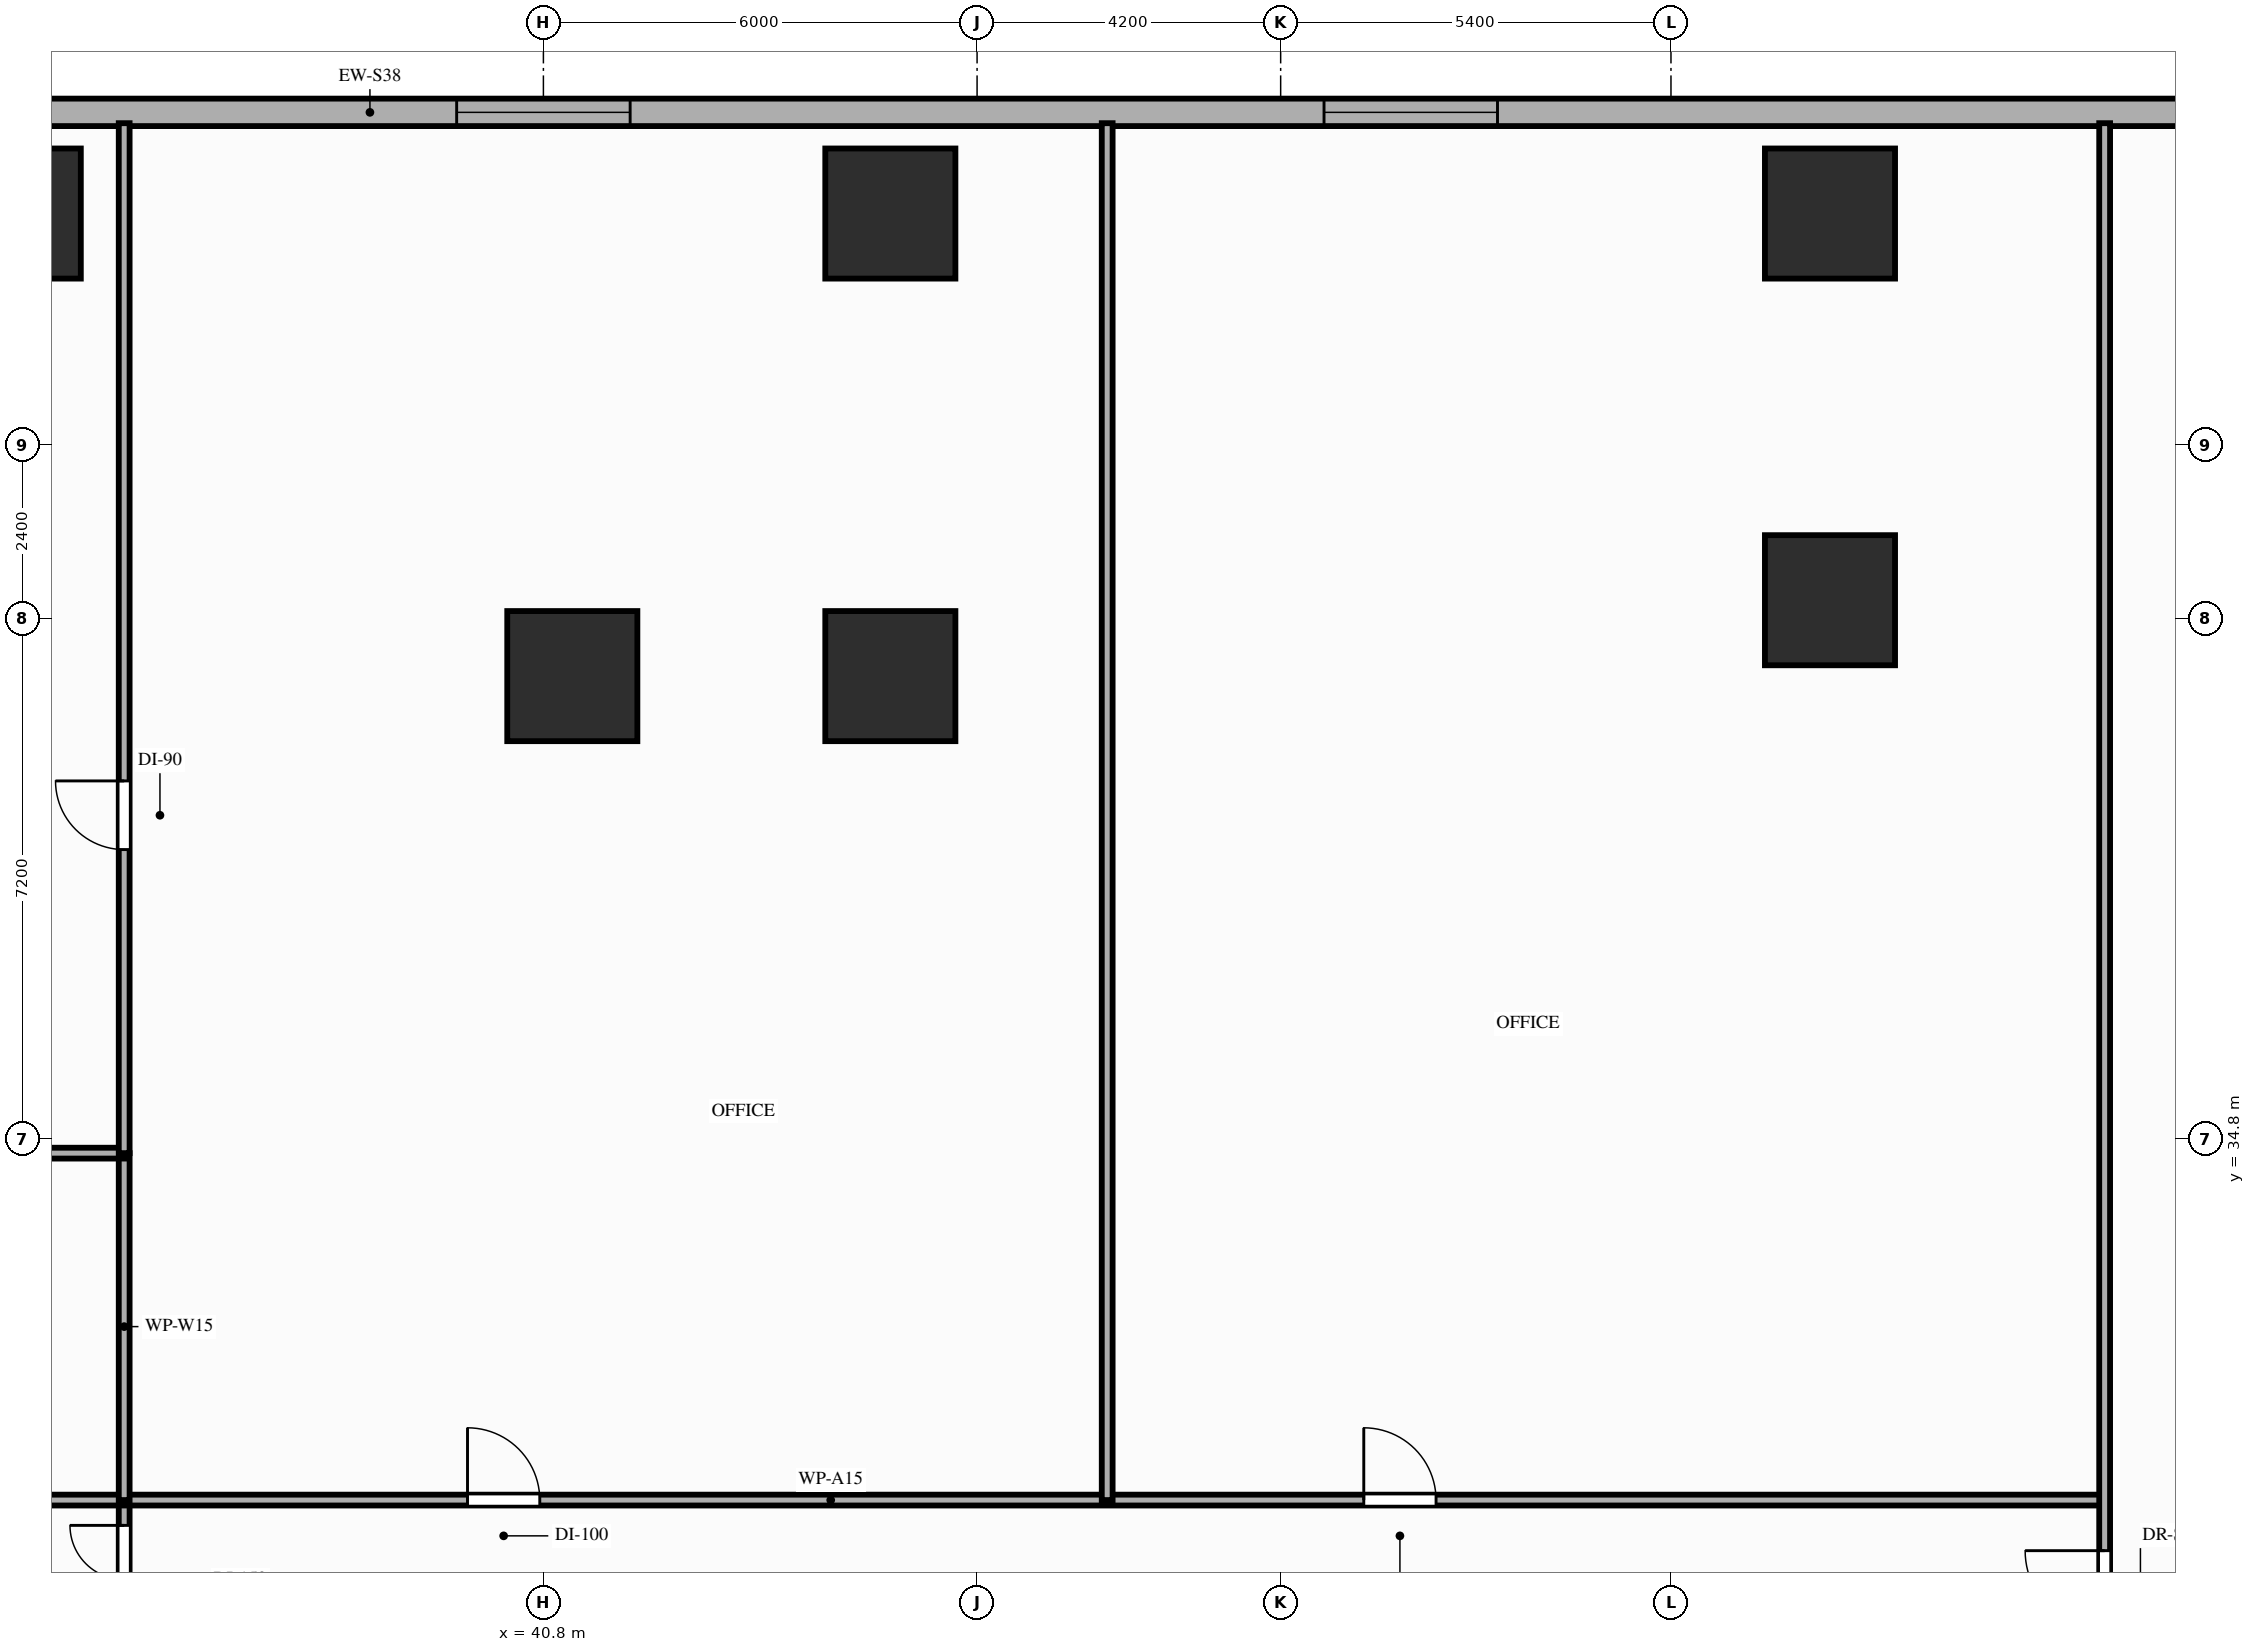
"""IFC4 building model, lengths in metres.
Left out: names, types, materials, properties, quantities, classifications, styles, units other than length and angle.
Written with IfcOpenShell. Run it as: python <this file> out.ifc"""

import sys

from ifc_helpers import new_model, si_unit, direction, frame, frame_2d, origin, origin_2d, place, context, subcontext, project, spatial, rectangle, extrude, element, fill, save


model = new_model("IFC4")
c1 = context("Model", 3, precision=1e-05, world=origin(), true_north=direction((0.0, 1.0)))
c2 = subcontext(c1, "Body", "Model", "MODEL_VIEW")
j1 = project(units=[si_unit("LENGTHUNIT", "METRE"), si_unit("PLANEANGLEUNIT", "RADIAN")], contexts=[c1])
p1 = place(None, origin())
s1 = spatial("IfcSite", under=j1, at=p1, CompositionType="ELEMENT")
p2 = place(p1, origin())
s2 = spatial("IfcBuilding", under=s1, at=p2, CompositionType="ELEMENT")
p3 = place(p2, frame((0.0, 0.0, 4.6)))
s3 = spatial("IfcBuildingStorey", under=s2, at=p3, CompositionType="ELEMENT", Elevation=4.6)
for number, where, z_axis, x_axis in (
    (1, (41.2, 41.2, 0.0), (0.0, 0.0, 1.0), (1.0, 0.0, 0.0)),
    (2, (45.6, 41.2, 0.0), (0.0, 0.0, 1.0), (1.0, 0.0, 0.0)),
    (3, (58.6, 42.25, 0.0), (0.0, 0.0, 1.0), (1.0, 0.0, 0.0)),
    (4, (33.5, 47.6, 0.0), (0.0, 0.0, 1.0), (1.0, 0.0, 0.0)),
    (5, (45.6, 47.6, 0.0), (0.0, 0.0, 1.0), (1.0, 0.0, 0.0)),
    (6, (58.6, 47.6, 0.0), (0.0, 0.0, 1.0), (1.0, 0.0, 0.0)),
):
    element("IfcColumn", number, at=place(p3, frame(where, z_axis=z_axis, x_axis=x_axis)), inside=s3, PredefinedType="COLUMN", context=c2, shape_type="SweptSolid", body=[
        extrude(rectangle(XDim=1.8, YDim=1.8, at=origin_2d()), origin(), (0.0, 0.0, 1.0), 4.2),
    ])
p4 = place(p3, frame((73.2, 49.0, 0.0), z_axis=(0.0, 0.0, 1.0), x_axis=(-1.0, 0.0, 0.0)))
e7 = element("IfcWall", 7, at=p4, inside=s3, PredefinedType="STANDARD", context=c2, shape_type="SweptSolid", body=[
    extrude(rectangle(XDim=69.6, YDim=0.38, at=frame_2d((34.8, 0.0))), origin(), (0.0, 0.0, 1.0), 3.95),
])
p5 = place(p4, frame((3.4, 0.0, 0.9)))
e8 = element("IfcOpeningElement", 8, at=p5, cuts=e7, PredefinedType="OPENING", context=c2, shape_type="SweptSolid", body=[
    extrude(rectangle(XDim=2.4, YDim=2.15, at=frame_2d((1.2, 1.075))), frame((0.0, 0.2, 0.0), z_axis=(0.0, -1.0, 0.0), x_axis=(1.0, 0.0, 0.0)), (0.0, 0.0, 1.0), 0.4),
])
p6 = place(p4, frame((19.2, 0.0, 0.9)))
e9 = element("IfcOpeningElement", 9, at=p6, cuts=e7, PredefinedType="OPENING", context=c2, shape_type="SweptSolid", body=[
    extrude(rectangle(XDim=2.4, YDim=2.15, at=frame_2d((1.2, 1.075))), frame((0.0, 0.2, 0.0), z_axis=(0.0, -1.0, 0.0), x_axis=(1.0, 0.0, 0.0)), (0.0, 0.0, 1.0), 0.4),
])
p7 = place(p4, frame((31.2, 0.0, 0.9)))
e10 = element("IfcOpeningElement", 10, at=p7, cuts=e7, PredefinedType="OPENING", context=c2, shape_type="SweptSolid", body=[
    extrude(rectangle(XDim=2.4, YDim=2.15, at=frame_2d((1.2, 1.075))), frame((0.0, 0.2, 0.0), z_axis=(0.0, -1.0, 0.0), x_axis=(1.0, 0.0, 0.0)), (0.0, 0.0, 1.0), 0.4),
])
p8 = place(p4, frame((43.4, 0.0, 0.9)))
e11 = element("IfcOpeningElement", 11, at=p8, cuts=e7, PredefinedType="OPENING", context=c2, shape_type="SweptSolid", body=[
    extrude(rectangle(XDim=2.4, YDim=2.15, at=frame_2d((1.2, 1.075))), frame((0.0, 0.2, 0.0), z_axis=(0.0, -1.0, 0.0), x_axis=(1.0, 0.0, 0.0)), (0.0, 0.0, 1.0), 0.4),
])
p9 = place(p4, frame((55.6, 0.0, 0.9)))
e12 = element("IfcOpeningElement", 12, at=p9, cuts=e7, PredefinedType="OPENING", context=c2, shape_type="SweptSolid", body=[
    extrude(rectangle(XDim=2.4, YDim=2.15, at=frame_2d((1.2, 1.075))), frame((0.0, 0.2, 0.0), z_axis=(0.0, -1.0, 0.0), x_axis=(1.0, 0.0, 0.0)), (0.0, 0.0, 1.0), 0.4),
])
p10 = place(p3, frame((35.0, 27.6, 0.0), z_axis=(0.0, 0.0, 1.0), x_axis=(0.0, 1.0, 0.0)))
e13 = element("IfcWall", 13, at=p10, inside=s3, PredefinedType="PARTITIONING", context=c2, shape_type="SweptSolid", body=[
    extrude(rectangle(XDim=2.2, YDim=0.15, at=frame_2d((1.1, 0.0))), origin(), (0.0, 0.0, 1.0), 3.23),
])
p11 = place(p10, frame((0.35, 0.0, 0.0)))
e14 = element("IfcOpeningElement", 14, at=p11, cuts=e13, PredefinedType="OPENING", context=c2, shape_type="SweptSolid", body=[
    extrude(rectangle(XDim=1.5, YDim=2.18, at=frame_2d((0.75, 1.09))), frame((0.0, 0.085, 0.0), z_axis=(0.0, -1.0, 0.0), x_axis=(1.0, 0.0, 0.0)), (0.0, 0.0, 1.0), 0.17),
])
p12 = place(p3, frame((27.15, 29.8, 0.0), z_axis=(0.0, 0.0, 1.0), x_axis=(1.0, 0.0, 0.0)))
e15 = element("IfcWall", 15, at=p12, inside=s3, PredefinedType="PARTITIONING", context=c2, shape_type="SweptSolid", body=[
    extrude(rectangle(XDim=35.25, YDim=0.15, at=frame_2d((17.625, 0.0))), origin(), (0.0, 0.0, 1.0), 3.23),
])
p13 = place(p12, frame((25.0, 0.0, 0.0)))
e16 = element("IfcOpeningElement", 16, at=p13, cuts=e15, PredefinedType="OPENING", context=c2, shape_type="SweptSolid", body=[
    extrude(rectangle(XDim=1.0, YDim=2.15, at=frame_2d((0.5, 1.075))), frame((0.0, 0.085, 0.0), z_axis=(0.0, -1.0, 0.0), x_axis=(1.0, 0.0, 0.0)), (0.0, 0.0, 1.0), 0.17),
])
p14 = place(p12, frame((1.4, 0.0, 0.0)))
e17 = element("IfcOpeningElement", 17, at=p14, cuts=e15, PredefinedType="OPENING", context=c2, shape_type="SweptSolid", body=[
    extrude(rectangle(XDim=0.85, YDim=2.1, at=frame_2d((0.425, 1.05))), frame((0.0, 0.085, 0.0), z_axis=(0.0, -1.0, 0.0), x_axis=(1.0, 0.0, 0.0)), (0.0, 0.0, 1.0), 0.17),
])
p15 = place(p12, frame((5.4, 0.0, 0.0)))
e18 = element("IfcOpeningElement", 18, at=p15, cuts=e15, PredefinedType="OPENING", context=c2, shape_type="SweptSolid", body=[
    extrude(rectangle(XDim=0.95, YDim=2.1, at=frame_2d((0.475, 1.05))), frame((0.0, 0.085, 0.0), z_axis=(0.0, -1.0, 0.0), x_axis=(1.0, 0.0, 0.0)), (0.0, 0.0, 1.0), 0.17),
])
p16 = place(p12, frame((12.6, 0.0, 0.0)))
e19 = element("IfcOpeningElement", 19, at=p16, cuts=e15, PredefinedType="OPENING", context=c2, shape_type="SweptSolid", body=[
    extrude(rectangle(XDim=1.0, YDim=2.15, at=frame_2d((0.5, 1.075))), frame((0.0, 0.085, 0.0), z_axis=(0.0, -1.0, 0.0), x_axis=(1.0, 0.0, 0.0)), (0.0, 0.0, 1.0), 0.17),
])
p17 = place(p3, frame((35.0, 29.8, 0.0), z_axis=(0.0, 0.0, 1.0), x_axis=(0.0, 1.0, 0.0)))
e20 = element("IfcWall", 20, at=p17, inside=s3, PredefinedType="PARTITIONING", context=c2, shape_type="SweptSolid", body=[
    extrude(rectangle(XDim=4.8, YDim=0.15, at=frame_2d((2.4, 0.0))), origin(), (0.0, 0.0, 1.0), 3.95),
])
p18 = place(p3, frame((27.15, 34.6, 0.0), z_axis=(0.0, 0.0, 1.0), x_axis=(1.0, 0.0, 0.0)))
e21 = element("IfcWall", 21, at=p18, inside=s3, PredefinedType="PARTITIONING", context=c2, shape_type="SweptSolid", body=[
    extrude(rectangle(XDim=7.85, YDim=0.15, at=frame_2d((3.925, 0.0))), origin(), (0.0, 0.0, 1.0), 3.23),
])
p19 = place(p3, frame((35.0, 34.6, 0.0), z_axis=(0.0, 0.0, 1.0), x_axis=(0.0, 1.0, 0.0)))
e22 = element("IfcWall", 22, at=p19, inside=s3, PredefinedType="PARTITIONING", context=c2, shape_type="SweptSolid", body=[
    extrude(rectangle(XDim=14.25, YDim=0.15, at=frame_2d((7.125, 0.0))), origin(), (0.0, 0.0, 1.0), 3.23),
])
p20 = place(p19, frame((4.2, 0.0, 0.0)))
e23 = element("IfcOpeningElement", 23, at=p20, cuts=e22, PredefinedType="OPENING", context=c2, shape_type="SweptSolid", body=[
    extrude(rectangle(XDim=0.95, YDim=2.15, at=frame_2d((0.475, 1.075))), frame((0.0, 0.085, 0.0), z_axis=(0.0, -1.0, 0.0), x_axis=(1.0, 0.0, 0.0)), (0.0, 0.0, 1.0), 0.17),
])
p21 = place(p3, frame((48.6, 29.8, 0.0), z_axis=(0.0, 0.0, 1.0), x_axis=(0.0, 1.0, 0.0)))
e24 = element("IfcWall", 24, at=p21, inside=s3, PredefinedType="PARTITIONING", context=c2, shape_type="SweptSolid", body=[
    extrude(rectangle(XDim=19.05, YDim=0.15, at=frame_2d((9.525, 0.0))), origin(), (0.0, 0.0, 1.0), 3.23),
])
p22 = place(p3, frame((62.4, 21.8, 0.0), z_axis=(0.0, 0.0, 1.0), x_axis=(0.0, 1.0, 0.0)))
e25 = element("IfcWall", 25, at=p22, inside=s3, PredefinedType="PARTITIONING", context=c2, shape_type="SweptSolid", body=[
    extrude(rectangle(XDim=27.05, YDim=0.15, at=frame_2d((13.525, 0.0))), origin(), (0.0, 0.0, 1.0), 3.23),
])
p23 = place(p22, frame((6.2, 0.0, 0.0)))
e26 = element("IfcOpeningElement", 26, at=p23, cuts=e25, PredefinedType="OPENING", context=c2, shape_type="SweptSolid", body=[
    extrude(rectangle(XDim=1.1, YDim=2.15, at=frame_2d((0.55, 1.075))), frame((0.0, 0.085, 0.0), z_axis=(0.0, -1.0, 0.0), x_axis=(1.0, 0.0, 0.0)), (0.0, 0.0, 1.0), 0.17),
])
p24 = place(p6, origin())
e27 = element("IfcWindow", 27, at=p24, inside=s3, PartitioningType="SINGLE_PANEL", PredefinedType="WINDOW", context=c2, shape_type="SweptSolid", body=[
    extrude(rectangle(XDim=2.4, YDim=2.15, at=frame_2d((1.2, 1.075))), frame((0.0, 0.03, 0.0), z_axis=(0.0, -1.0, 0.0), x_axis=(1.0, 0.0, 0.0)), (0.0, 0.0, 1.0), 0.06),
])
fill(e9, e27)
p25 = place(p7, origin())
e28 = element("IfcWindow", 28, at=p25, inside=s3, PartitioningType="SINGLE_PANEL", PredefinedType="WINDOW", context=c2, shape_type="SweptSolid", body=[
    extrude(rectangle(XDim=2.4, YDim=2.15, at=frame_2d((1.2, 1.075))), frame((0.0, 0.03, 0.0), z_axis=(0.0, -1.0, 0.0), x_axis=(1.0, 0.0, 0.0)), (0.0, 0.0, 1.0), 0.06),
])
fill(e10, e28)
p26 = place(p13, origin())
e29 = element("IfcDoor", 29, at=p26, inside=s3, OperationType="SINGLE_SWING_LEFT", PredefinedType="DOOR", context=c2, shape_type="SweptSolid", body=[
    extrude(rectangle(XDim=1.0, YDim=2.15, at=frame_2d((0.5, 1.075))), frame((0.0, 0.025, 0.0), z_axis=(0.0, -1.0, 0.0), x_axis=(1.0, 0.0, 0.0)), (0.0, 0.0, 1.0), 0.05),
])
fill(e16, e29)
p27 = place(p11, origin())
e30 = element("IfcDoor", 30, at=p27, inside=s3, OperationType="DOUBLE_DOOR_SINGLE_SWING", PredefinedType="DOOR", context=c2, shape_type="SweptSolid", body=[
    extrude(rectangle(XDim=1.5, YDim=2.18, at=frame_2d((0.75, 1.09))), frame((0.0, 0.025, 0.0), z_axis=(0.0, -1.0, 0.0), x_axis=(1.0, 0.0, 0.0)), (0.0, 0.0, 1.0), 0.05),
])
fill(e14, e30)
p28 = place(p23, origin())
e31 = element("IfcDoor", 31, at=p28, inside=s3, OperationType="SINGLE_SWING_RIGHT", PredefinedType="DOOR", context=c2, shape_type="SweptSolid", body=[
    extrude(rectangle(XDim=1.1, YDim=2.15, at=frame_2d((0.55, 1.075))), frame((0.0, 0.025, 0.0), z_axis=(0.0, -1.0, 0.0), x_axis=(1.0, 0.0, 0.0)), (0.0, 0.0, 1.0), 0.05),
])
fill(e26, e31)
p29 = place(p16, origin())
e32 = element("IfcDoor", 32, at=p29, inside=s3, OperationType="SINGLE_SWING_LEFT", PredefinedType="DOOR", context=c2, shape_type="SweptSolid", body=[
    extrude(rectangle(XDim=1.0, YDim=2.15, at=frame_2d((0.5, 1.075))), frame((0.0, 0.025, 0.0), z_axis=(0.0, -1.0, 0.0), x_axis=(1.0, 0.0, 0.0)), (0.0, 0.0, 1.0), 0.05),
])
fill(e19, e32)
p30 = place(p20, origin())
e33 = element("IfcDoor", 33, at=p30, inside=s3, OperationType="SINGLE_SWING_RIGHT", PredefinedType="DOOR", context=c2, shape_type="SweptSolid", body=[
    extrude(rectangle(XDim=0.95, YDim=2.15, at=frame_2d((0.475, 1.075))), frame((0.0, 0.025, 0.0), z_axis=(0.0, -1.0, 0.0), x_axis=(1.0, 0.0, 0.0)), (0.0, 0.0, 1.0), 0.05),
])
fill(e23, e33)
save(model, sys.argv[1])
